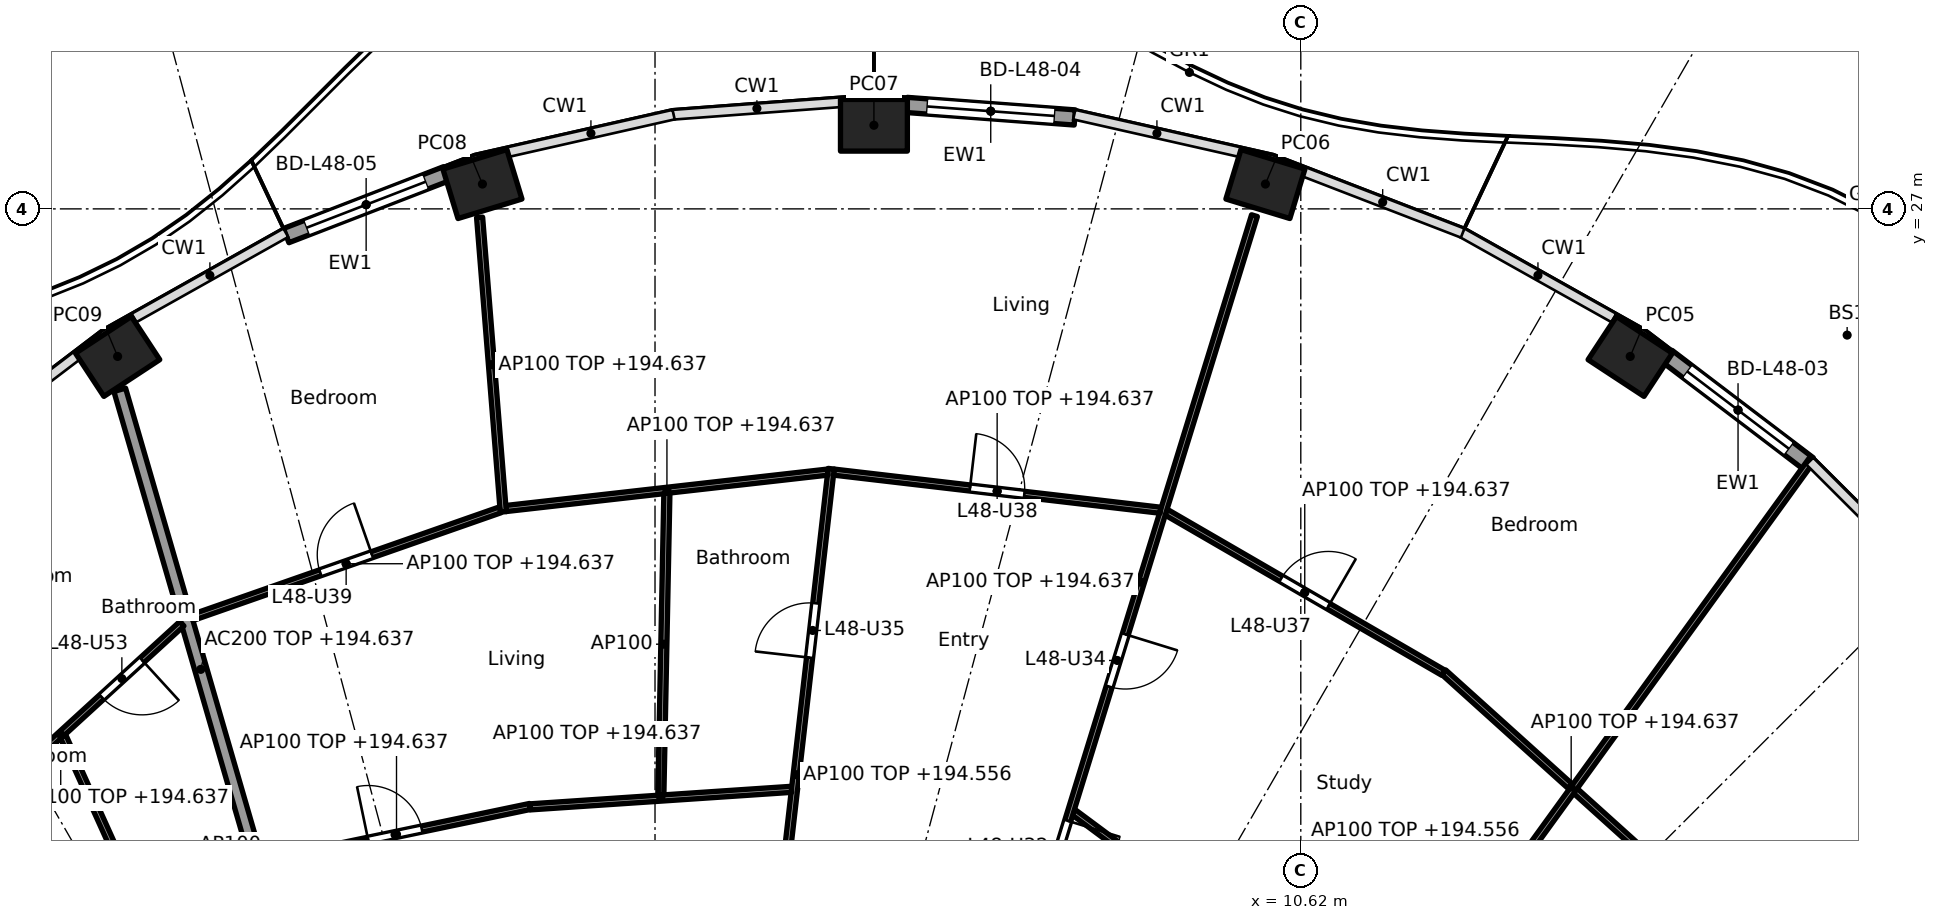
"""IFC4 building model, lengths in metres.
Left out: names, types, materials, properties, quantities, classifications, styles, units other than length and angle.
Written with IfcOpenShell. Run it as: python <this file> out.ifc"""

import sys

from ifc_helpers import new_model, si_unit, direction, frame, frame_2d, origin, origin_2d, place, context, subcontext, project, spatial, rectangle, hollow_rectangle, extrude, element, fill, save


model = new_model("IFC4")
c1 = context("Model", 3, precision=1e-05, world=origin(), true_north=direction((0.0, 1.0)))
c2 = subcontext(c1, "Body", "Model", "MODEL_VIEW")
j1 = project(units=[si_unit("LENGTHUNIT", "METRE"), si_unit("PLANEANGLEUNIT", "RADIAN")], contexts=[c1])
p1 = place(None, origin())
s1 = spatial("IfcSite", under=j1, at=p1, CompositionType="ELEMENT")
p2 = place(p1, origin())
s2 = spatial("IfcBuilding", under=s1, at=p2, CompositionType="ELEMENT")
p3 = place(p2, frame((0.0, 0.0, 191.8)))
s3 = spatial("IfcBuildingStorey", under=s2, at=p3, CompositionType="ELEMENT", Elevation=191.8)
for number, where, z_axis, x_axis in (
    (1, (16.038, 24.573, 0.0), (0.0, 0.0, 1.0), (-0.836, 0.549, 0.0)),
    (2, (10.038, 27.408, 0.0), (0.0, 0.0, 1.0), (-0.957, 0.292, 0.0)),
    (3, (3.6, 28.375, 0.0), (0.0, 0.0, 1.0), (-1.0, 0.0, 0.0)),
    (4, (-2.838, 27.408, 0.0), (0.0, 0.0, 1.0), (-0.957, -0.292, 0.0)),
    (5, (-8.837, 24.573, 0.0), (0.0, 0.0, 1.0), (-0.836, -0.549, 0.0)),
):
    element("IfcColumn", number, at=place(p3, frame(where, z_axis=z_axis, x_axis=x_axis)), inside=s3, PredefinedType="COLUMN", context=c2, shape_type="SweptSolid", body=[
        extrude(hollow_rectangle(XDim=1.1, YDim=0.85, WallThickness=0.036, at=origin_2d()), origin(), (0.0, 0.0, 1.0), 3.7),
    ])
p4 = place(p3, frame((16.65, 24.574, 0.0), z_axis=(0.0, 0.0, 1.0), x_axis=(0.796055733703, -0.60522332146, 0.0)))
e6 = element("IfcWall", 6, at=p4, inside=s3, PredefinedType="SOLIDWALL", context=c2, shape_type="SweptSolid", body=[
    extrude(rectangle(XDim=2.917, YDim=0.25, at=frame_2d((1.458, 0.0))), origin(), (0.0, 0.0, 1.0), 3.44),
])
p5 = place(p4, frame((0.408, 0.0, 0.0)))
e7 = element("IfcOpeningElement", 7, at=p5, cuts=e6, PredefinedType="OPENING", context=c2, shape_type="SweptSolid", body=[
    extrude(rectangle(XDim=2.1, YDim=2.4, at=frame_2d((1.05, 1.2))), frame((0.0, 0.135, 0.0), z_axis=(0.0, -1.0, 0.0), x_axis=(1.0, 0.0, 0.0)), (0.0, 0.0, 1.0), 0.27),
])
p6 = place(p3, frame((4.139, 28.709, 0.0), z_axis=(0.0, 0.0, 1.0), x_axis=(0.997232064422, -0.074351931305, 0.0)))
e8 = element("IfcWall", 8, at=p6, inside=s3, PredefinedType="SOLIDWALL", context=c2, shape_type="SweptSolid", body=[
    extrude(rectangle(XDim=2.771, YDim=0.25, at=frame_2d((1.386, 0.0))), origin(), (0.0, 0.0, 1.0), 3.44),
])
p7 = place(p6, frame((0.336, 0.0, 0.0)))
e9 = element("IfcOpeningElement", 9, at=p7, cuts=e8, PredefinedType="OPENING", context=c2, shape_type="SweptSolid", body=[
    extrude(rectangle(XDim=2.1, YDim=2.4, at=frame_2d((1.05, 1.2))), frame((0.0, 0.135, 0.0), z_axis=(0.0, -1.0, 0.0), x_axis=(1.0, 0.0, 0.0)), (0.0, 0.0, 1.0), 0.27),
])
p8 = place(p3, frame((-6.065, 26.56, 0.0), z_axis=(0.0, 0.0, 1.0), x_axis=(0.932795487898, 0.360406128911, 0.0)))
e10 = element("IfcWall", 10, at=p8, inside=s3, PredefinedType="SOLIDWALL", context=c2, shape_type="SweptSolid", body=[
    extrude(rectangle(XDim=2.819, YDim=0.25, at=frame_2d((1.41, 0.0))), origin(), (0.0, 0.0, 1.0), 3.44),
])
p9 = place(p8, frame((0.36, 0.0, 0.0)))
e11 = element("IfcOpeningElement", 11, at=p9, cuts=e10, PredefinedType="OPENING", context=c2, shape_type="SweptSolid", body=[
    extrude(rectangle(XDim=2.1, YDim=2.4, at=frame_2d((1.05, 1.2))), frame((0.0, 0.135, 0.0), z_axis=(0.0, -1.0, 0.0), x_axis=(1.0, 0.0, 0.0)), (0.0, 0.0, 1.0), 0.27),
])
p10 = place(p3, frame((-6.137, 14.83, 0.0), z_axis=(0.0, 0.0, 1.0), x_axis=(-0.278461169897, 0.96044748782, 0.0)))
e12 = element("IfcWall", 12, at=p10, inside=s3, PredefinedType="PARTITIONING", context=c2, shape_type="SweptSolid", body=[
    extrude(rectangle(XDim=9.573, YDim=0.2, at=frame_2d((4.787, 0.0))), origin(), (0.0, 0.0, 1.0), 2.837),
])
p11 = place(p3, frame((17.162, 15.603, 0.0), z_axis=(0.0, 0.0, 1.0), x_axis=(-0.742768881471, 0.669547898748, 0.0)))
e13 = element("IfcWall", 13, at=p11, inside=s3, PredefinedType="PARTITIONING", context=c2, shape_type="SweptSolid", body=[
    extrude(rectangle(XDim=5.642, YDim=0.1, at=frame_2d((2.821, 0.0))), origin(), (0.0, 0.0, 1.0), 2.837),
])
p12 = place(p3, frame((8.943, 8.966, 0.0), z_axis=(0.0, 0.0, 1.0), x_axis=(0.586803608919, 0.809729290912, 0.0)))
e14 = element("IfcWall", 14, at=p12, inside=s3, PredefinedType="PARTITIONING", context=c2, shape_type="SweptSolid", body=[
    extrude(rectangle(XDim=17.179, YDim=0.1, at=frame_2d((8.589, 0.0))), origin(), (0.0, 0.0, 1.0), 2.756),
])
p13 = place(p12, frame((2.062, 0.0, 0.0)))
e15 = element("IfcOpeningElement", 15, at=p13, cuts=e14, PredefinedType="OPENING", context=c2, shape_type="SweptSolid", body=[
    extrude(rectangle(XDim=0.9, YDim=2.1, at=frame_2d((0.45, 1.05))), frame((0.0, 0.06, 0.0), z_axis=(0.0, -1.0, 0.0), x_axis=(1.0, 0.0, 0.0)), (0.0, 0.0, 1.0), 0.12),
])
p14 = place(p12, frame((7.308, 0.0, 0.0)))
e16 = element("IfcOpeningElement", 16, at=p14, cuts=e14, PredefinedType="OPENING", context=c2, shape_type="SweptSolid", body=[
    extrude(rectangle(XDim=0.9, YDim=2.1, at=frame_2d((0.45, 1.05))), frame((0.0, 0.06, 0.0), z_axis=(0.0, -1.0, 0.0), x_axis=(1.0, 0.0, 0.0)), (0.0, 0.0, 1.0), 0.12),
])
p15 = place(p3, frame((10.207, 14.61, 0.0), z_axis=(0.0, 0.0, 1.0), x_axis=(-0.802784956441, 0.596268659005, 0.0)))
e17 = element("IfcWall", 17, at=p15, inside=s3, PredefinedType="PARTITIONING", context=c2, shape_type="SweptSolid", body=[
    extrude(rectangle(XDim=4.142, YDim=0.1, at=frame_2d((2.071, 0.0))), origin(), (0.0, 0.0, 1.0), 2.837),
])
p16 = place(p3, frame((12.965, 19.371, 0.0), z_axis=(0.0, 0.0, 1.0), x_axis=(-0.865277177388, 0.501293732547, 0.0)))
e18 = element("IfcWall", 18, at=p16, inside=s3, PredefinedType="PARTITIONING", context=c2, shape_type="SweptSolid", body=[
    extrude(rectangle(XDim=5.27, YDim=0.1, at=frame_2d((2.635, 0.0))), origin(), (0.0, 0.0, 1.0), 2.837),
])
p17 = place(p16, frame((2.185, 0.0, 0.0)))
e19 = element("IfcOpeningElement", 19, at=p17, cuts=e18, PredefinedType="OPENING", context=c2, shape_type="SweptSolid", body=[
    extrude(rectangle(XDim=0.9, YDim=2.1, at=frame_2d((0.45, 1.05))), frame((0.0, 0.06, 0.0), z_axis=(0.0, -1.0, 0.0), x_axis=(1.0, 0.0, 0.0)), (0.0, 0.0, 1.0), 0.12),
])
p18 = place(p3, frame((6.138, 14.83, 0.0), z_axis=(0.0, 0.0, 1.0), x_axis=(0.294818517221, 0.955553264818, 0.0)))
e20 = element("IfcWall", 20, at=p18, inside=s3, PredefinedType="PARTITIONING", context=c2, shape_type="SweptSolid", body=[
    extrude(rectangle(XDim=12.619, YDim=0.1, at=frame_2d((6.31, 0.0))), origin(), (0.0, 0.0, 1.0), 2.837),
])
p19 = place(p18, frame((1.306, 0.0, 0.0)))
e21 = element("IfcOpeningElement", 21, at=p19, cuts=e20, PredefinedType="OPENING", context=c2, shape_type="SweptSolid", body=[
    extrude(rectangle(XDim=0.9, YDim=2.1, at=frame_2d((0.45, 1.05))), frame((0.0, 0.06, 0.0), z_axis=(0.0, -1.0, 0.0), x_axis=(1.0, 0.0, 0.0)), (0.0, 0.0, 1.0), 0.12),
])
p20 = place(p18, frame((4.515, 0.0, 0.0)))
e22 = element("IfcOpeningElement", 22, at=p20, cuts=e20, PredefinedType="OPENING", context=c2, shape_type="SweptSolid", body=[
    extrude(rectangle(XDim=0.9, YDim=2.1, at=frame_2d((0.45, 1.05))), frame((0.0, 0.06, 0.0), z_axis=(0.0, -1.0, 0.0), x_axis=(1.0, 0.0, 0.0)), (0.0, 0.0, 1.0), 0.12),
])
p21 = place(p3, frame((8.312, 22.044, 0.0), z_axis=(0.0, 0.0, 1.0), x_axis=(-0.993245806382, 0.1160291692, 0.0)))
e23 = element("IfcWall", 23, at=p21, inside=s3, PredefinedType="PARTITIONING", context=c2, shape_type="SweptSolid", body=[
    extrude(rectangle(XDim=5.408, YDim=0.1, at=frame_2d((2.704, 0.0))), origin(), (0.0, 0.0, 1.0), 2.837),
])
p22 = place(p21, frame((2.254, 0.0, 0.0)))
e24 = element("IfcOpeningElement", 24, at=p22, cuts=e23, PredefinedType="OPENING", context=c2, shape_type="SweptSolid", body=[
    extrude(rectangle(XDim=0.9, YDim=2.1, at=frame_2d((0.45, 1.05))), frame((0.0, 0.06, 0.0), z_axis=(0.0, -1.0, 0.0), x_axis=(1.0, 0.0, 0.0)), (0.0, 0.0, 1.0), 0.12),
])
p23 = place(p3, frame((1.746, 12.664, 0.0), z_axis=(0.0, 0.0, 1.0), x_axis=(0.113629529561, 0.993523190475, 0.0)))
e25 = element("IfcWall", 25, at=p23, inside=s3, PredefinedType="PARTITIONING", context=c2, shape_type="SweptSolid", body=[
    extrude(rectangle(XDim=10.128, YDim=0.1, at=frame_2d((5.064, 0.0))), origin(), (0.0, 0.0, 1.0), 2.756),
])
p24 = place(p23, frame((1.962, 0.0, 0.0)))
e26 = element("IfcOpeningElement", 26, at=p24, cuts=e25, PredefinedType="OPENING", context=c2, shape_type="SweptSolid", body=[
    extrude(rectangle(XDim=0.9, YDim=2.1, at=frame_2d((0.45, 1.05))), frame((0.0, 0.06, 0.0), z_axis=(0.0, -1.0, 0.0), x_axis=(1.0, 0.0, 0.0)), (0.0, 0.0, 1.0), 0.12),
])
p25 = place(p23, frame((7.002, 0.0, 0.0)))
e27 = element("IfcOpeningElement", 27, at=p25, cuts=e25, PredefinedType="OPENING", context=c2, shape_type="SweptSolid", body=[
    extrude(rectangle(XDim=0.9, YDim=2.1, at=frame_2d((0.45, 1.05))), frame((0.0, 0.06, 0.0), z_axis=(0.0, -1.0, 0.0), x_axis=(1.0, 0.0, 0.0)), (0.0, 0.0, 1.0), 0.12),
])
p26 = place(p3, frame((2.244, 17.455, 0.0), z_axis=(0.0, 0.0, 1.0), x_axis=(-0.997754717554, -0.066974051687, 0.0)))
e28 = element("IfcWall", 28, at=p26, inside=s3, PredefinedType="PARTITIONING", context=c2, shape_type="SweptSolid", body=[
    extrude(rectangle(XDim=4.309, YDim=0.1, at=frame_2d((2.154, 0.0))), origin(), (0.0, 0.0, 1.0), 2.837),
])
p27 = place(p3, frame((2.842, 22.671, 0.0), z_axis=(0.0, 0.0, 1.0), x_axis=(-0.993660315081, -0.112424099879, 0.0)))
e29 = element("IfcWall", 29, at=p27, inside=s3, PredefinedType="PARTITIONING", context=c2, shape_type="SweptSolid", body=[
    extrude(rectangle(XDim=5.325, YDim=0.1, at=frame_2d((2.662, 0.0))), origin(), (0.0, 0.0, 1.0), 2.837),
])
p28 = place(p3, frame((0.096, 17.36, 0.0), z_axis=(0.0, 0.0, 1.0), x_axis=(0.019973380305, 0.999800512142, 0.0)))
e30 = element("IfcWall", 30, at=p28, inside=s3, PredefinedType="PARTITIONING", context=c2, shape_type="SweptSolid", body=[
    extrude(rectangle(XDim=4.963, YDim=0.1, at=frame_2d((2.481, 0.0))), origin(), (0.0, 0.0, 1.0), 3.44),
])
p29 = place(p3, frame((-2.056, 17.173, 0.0), z_axis=(0.0, 0.0, 1.0), x_axis=(-0.978902917122, -0.20432591331, 0.0)))
e31 = element("IfcWall", 31, at=p29, inside=s3, PredefinedType="PARTITIONING", context=c2, shape_type="SweptSolid", body=[
    extrude(rectangle(XDim=4.486, YDim=0.1, at=frame_2d((2.243, 0.0))), origin(), (0.0, 0.0, 1.0), 2.837),
])
p30 = place(p29, frame((1.818, 0.0, 0.0)))
e32 = element("IfcOpeningElement", 32, at=p30, cuts=e31, PredefinedType="OPENING", context=c2, shape_type="SweptSolid", body=[
    extrude(rectangle(XDim=0.9, YDim=2.1, at=frame_2d((0.45, 1.05))), frame((0.0, 0.06, 0.0), z_axis=(0.0, -1.0, 0.0), x_axis=(1.0, 0.0, 0.0)), (0.0, 0.0, 1.0), 0.12),
])
p31 = place(p3, frame((-2.495, 22.017, 0.0), z_axis=(0.0, 0.0, 1.0), x_axis=(-0.080150660566, 0.99678276049, 0.0)))
e33 = element("IfcWall", 33, at=p31, inside=s3, PredefinedType="PARTITIONING", context=c2, shape_type="SweptSolid", body=[
    extrude(rectangle(XDim=4.858, YDim=0.1, at=frame_2d((2.429, 0.0))), origin(), (0.0, 0.0, 1.0), 2.837),
])
p32 = place(p3, frame((-2.546, 22.051, 0.0), z_axis=(0.0, 0.0, 1.0), x_axis=(-0.94391294884, -0.330194404878, 0.0)))
e34 = element("IfcWall", 34, at=p32, inside=s3, PredefinedType="PARTITIONING", context=c2, shape_type="SweptSolid", body=[
    extrude(rectangle(XDim=5.367, YDim=0.1, at=frame_2d((2.684, 0.0))), origin(), (0.0, 0.0, 1.0), 2.837),
])
p33 = place(p32, frame((2.234, 0.0, 0.0)))
e35 = element("IfcOpeningElement", 35, at=p33, cuts=e34, PredefinedType="OPENING", context=c2, shape_type="SweptSolid", body=[
    extrude(rectangle(XDim=0.9, YDim=2.1, at=frame_2d((0.45, 1.05))), frame((0.0, 0.06, 0.0), z_axis=(0.0, -1.0, 0.0), x_axis=(1.0, 0.0, 0.0)), (0.0, 0.0, 1.0), 0.12),
])
p34 = place(p3, frame((-7.781, 20.178, 0.0), z_axis=(0.0, 0.0, 1.0), x_axis=(-0.73807320557, -0.674720640872, 0.0)))
e36 = element("IfcWall", 36, at=p34, inside=s3, PredefinedType="PARTITIONING", context=c2, shape_type="SweptSolid", body=[
    extrude(rectangle(XDim=5.399, YDim=0.1, at=frame_2d((2.699, 0.0))), origin(), (0.0, 0.0, 1.0), 2.837),
])
p35 = place(p34, frame((0.887, 0.0, 0.0)))
e37 = element("IfcOpeningElement", 37, at=p35, cuts=e36, PredefinedType="OPENING", context=c2, shape_type="SweptSolid", body=[
    extrude(rectangle(XDim=0.9, YDim=2.1, at=frame_2d((0.45, 1.05))), frame((0.0, 0.06, 0.0), z_axis=(0.0, -1.0, 0.0), x_axis=(1.0, 0.0, 0.0)), (0.0, 0.0, 1.0), 0.12),
])
p36 = place(p3, frame((-8.125, 14.765, 0.0), z_axis=(0.0, 0.0, 1.0), x_axis=(-0.411745679848, 0.911298795745, 0.0)))
e38 = element("IfcWall", 38, at=p36, inside=s3, PredefinedType="PARTITIONING", context=c2, shape_type="SweptSolid", body=[
    extrude(rectangle(XDim=3.909, YDim=0.1, at=frame_2d((1.955, 0.0))), origin(), (0.0, 0.0, 1.0), 3.44),
])
p37 = place(p5, origin())
e39 = element("IfcDoor", 39, at=p37, inside=s3, OperationType="SLIDING_TO_LEFT", PredefinedType="DOOR", context=c2, shape_type="SweptSolid", body=[
    extrude(rectangle(XDim=2.1, YDim=2.4, at=frame_2d((1.05, 1.2))), frame((0.0, 0.025, 0.0), z_axis=(0.0, -1.0, 0.0), x_axis=(1.0, 0.0, 0.0)), (0.0, 0.0, 1.0), 0.05),
])
fill(e7, e39)
p38 = place(p7, origin())
e40 = element("IfcDoor", 40, at=p38, inside=s3, OperationType="SLIDING_TO_LEFT", PredefinedType="DOOR", context=c2, shape_type="SweptSolid", body=[
    extrude(rectangle(XDim=2.1, YDim=2.4, at=frame_2d((1.05, 1.2))), frame((0.0, 0.025, 0.0), z_axis=(0.0, -1.0, 0.0), x_axis=(1.0, 0.0, 0.0)), (0.0, 0.0, 1.0), 0.05),
])
fill(e9, e40)
p39 = place(p9, origin())
e41 = element("IfcDoor", 41, at=p39, inside=s3, OperationType="SLIDING_TO_LEFT", PredefinedType="DOOR", context=c2, shape_type="SweptSolid", body=[
    extrude(rectangle(XDim=2.1, YDim=2.4, at=frame_2d((1.05, 1.2))), frame((0.0, 0.025, 0.0), z_axis=(0.0, -1.0, 0.0), x_axis=(1.0, 0.0, 0.0)), (0.0, 0.0, 1.0), 0.05),
])
fill(e11, e41)
p40 = place(p19, frame((0.9, 0.0, 0.0), x_axis=(-1.0, 0.0, 0.0)))
e42 = element("IfcDoor", 42, at=p40, inside=s3, OperationType="SINGLE_SWING_LEFT", PredefinedType="DOOR", context=c2, shape_type="SweptSolid", body=[
    extrude(rectangle(XDim=0.9, YDim=2.1, at=frame_2d((0.45, 1.05))), frame((0.0, 0.025, 0.0), z_axis=(0.0, -1.0, 0.0), x_axis=(1.0, 0.0, 0.0)), (0.0, 0.0, 1.0), 0.05),
])
fill(e21, e42)
p41 = place(p20, frame((0.9, 0.0, 0.0), x_axis=(-1.0, 0.0, 0.0)))
e43 = element("IfcDoor", 43, at=p41, inside=s3, OperationType="SINGLE_SWING_LEFT", PredefinedType="DOOR", context=c2, shape_type="SweptSolid", body=[
    extrude(rectangle(XDim=0.9, YDim=2.1, at=frame_2d((0.45, 1.05))), frame((0.0, 0.025, 0.0), z_axis=(0.0, -1.0, 0.0), x_axis=(1.0, 0.0, 0.0)), (0.0, 0.0, 1.0), 0.05),
])
fill(e22, e43)
p42 = place(p25, origin())
e44 = element("IfcDoor", 44, at=p42, inside=s3, OperationType="SINGLE_SWING_LEFT", PredefinedType="DOOR", context=c2, shape_type="SweptSolid", body=[
    extrude(rectangle(XDim=0.9, YDim=2.1, at=frame_2d((0.45, 1.05))), frame((0.0, 0.025, 0.0), z_axis=(0.0, -1.0, 0.0), x_axis=(1.0, 0.0, 0.0)), (0.0, 0.0, 1.0), 0.05),
])
fill(e27, e44)
p43 = place(p30, frame((0.9, 0.0, 0.0), x_axis=(-1.0, 0.0, 0.0)))
e45 = element("IfcDoor", 45, at=p43, inside=s3, OperationType="SINGLE_SWING_LEFT", PredefinedType="DOOR", context=c2, shape_type="SweptSolid", body=[
    extrude(rectangle(XDim=0.9, YDim=2.1, at=frame_2d((0.45, 1.05))), frame((0.0, 0.025, 0.0), z_axis=(0.0, -1.0, 0.0), x_axis=(1.0, 0.0, 0.0)), (0.0, 0.0, 1.0), 0.05),
])
fill(e32, e45)
p44 = place(p17, frame((0.9, 0.0, 0.0), x_axis=(-1.0, 0.0, 0.0)))
e46 = element("IfcDoor", 46, at=p44, inside=s3, OperationType="SINGLE_SWING_RIGHT", PredefinedType="DOOR", context=c2, shape_type="SweptSolid", body=[
    extrude(rectangle(XDim=0.9, YDim=2.1, at=frame_2d((0.45, 1.05))), frame((0.0, 0.025, 0.0), z_axis=(0.0, -1.0, 0.0), x_axis=(1.0, 0.0, 0.0)), (0.0, 0.0, 1.0), 0.05),
])
fill(e19, e46)
p45 = place(p22, frame((0.9, 0.0, 0.0), x_axis=(-1.0, 0.0, 0.0)))
e47 = element("IfcDoor", 47, at=p45, inside=s3, OperationType="SINGLE_SWING_LEFT", PredefinedType="DOOR", context=c2, shape_type="SweptSolid", body=[
    extrude(rectangle(XDim=0.9, YDim=2.1, at=frame_2d((0.45, 1.05))), frame((0.0, 0.025, 0.0), z_axis=(0.0, -1.0, 0.0), x_axis=(1.0, 0.0, 0.0)), (0.0, 0.0, 1.0), 0.05),
])
fill(e24, e47)
p46 = place(p33, frame((0.9, 0.0, 0.0), x_axis=(-1.0, 0.0, 0.0)))
e48 = element("IfcDoor", 48, at=p46, inside=s3, OperationType="SINGLE_SWING_RIGHT", PredefinedType="DOOR", context=c2, shape_type="SweptSolid", body=[
    extrude(rectangle(XDim=0.9, YDim=2.1, at=frame_2d((0.45, 1.05))), frame((0.0, 0.025, 0.0), z_axis=(0.0, -1.0, 0.0), x_axis=(1.0, 0.0, 0.0)), (0.0, 0.0, 1.0), 0.05),
])
fill(e35, e48)
p47 = place(p35, origin())
e49 = element("IfcDoor", 49, at=p47, inside=s3, OperationType="SINGLE_SWING_LEFT", PredefinedType="DOOR", context=c2, shape_type="SweptSolid", body=[
    extrude(rectangle(XDim=0.9, YDim=2.1, at=frame_2d((0.45, 1.05))), frame((0.0, 0.025, 0.0), z_axis=(0.0, -1.0, 0.0), x_axis=(1.0, 0.0, 0.0)), (0.0, 0.0, 1.0), 0.05),
])
fill(e37, e49)
save(model, sys.argv[1])
